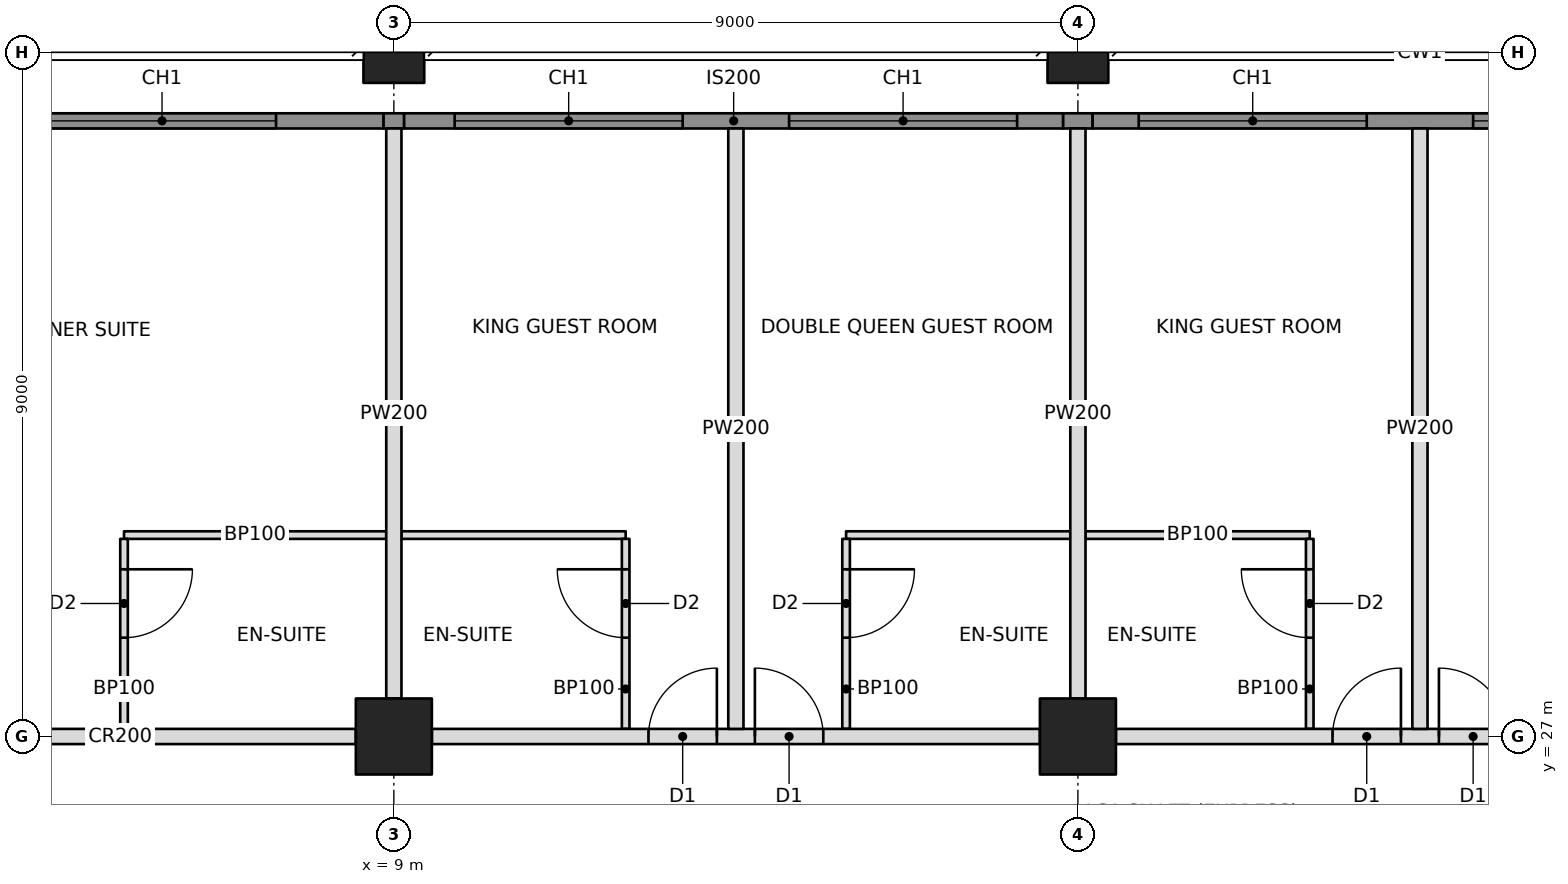
"""IFC4 building model, lengths in metres.
Left out: names, types, materials, properties, quantities, classifications, styles, units other than length and angle.
Written with IfcOpenShell. Run it as: python <this file> out.ifc"""

import sys

from ifc_helpers import new_model, si_unit, direction, frame, frame_2d, origin, origin_2d, place, context, subcontext, project, spatial, rectangle, hollow_rectangle, extrude, element, fill, save


model = new_model("IFC4")
c1 = context("Model", 3, precision=1e-05, world=origin(), true_north=direction((0.0, 1.0)))
c2 = subcontext(c1, "Body", "Model", "MODEL_VIEW")
j1 = project(units=[si_unit("LENGTHUNIT", "METRE"), si_unit("PLANEANGLEUNIT", "RADIAN")], contexts=[c1])
p1 = place(None, origin())
s1 = spatial("IfcSite", under=j1, at=p1, CompositionType="ELEMENT")
p2 = place(p1, origin())
s2 = spatial("IfcBuilding", under=s1, at=p2, CompositionType="ELEMENT")
p3 = place(p2, frame((0.0, 0.0, 97.6)))
s3 = spatial("IfcBuildingStorey", under=s2, at=p3, CompositionType="ELEMENT", Elevation=97.6)
p4 = place(p3, frame((9.0, 27.0, 0.0), z_axis=(0.0, 0.0, 1.0), x_axis=(1.0, 0.0, 0.0)))
e1 = element("IfcColumn", 1, at=p4, inside=s3, PredefinedType="COLUMN", context=c2, shape_type="SweptSolid", body=[
    extrude(hollow_rectangle(XDim=1.0, YDim=1.0, WallThickness=0.1, at=origin_2d()), origin(), (0.0, 0.0, 1.0), 3.4),
])
p5 = place(p3, frame((9.0, 36.0, 0.0), z_axis=(0.0, 0.0, 1.0), x_axis=(1.0, 0.0, 0.0)))
e2 = element("IfcColumn", 2, at=p5, inside=s3, PredefinedType="COLUMN", context=c2, shape_type="SweptSolid", body=[
    extrude(hollow_rectangle(XDim=0.8, YDim=0.8, WallThickness=0.07, at=origin_2d()), origin(), (0.0, 0.0, 1.0), 3.4),
])
p6 = place(p3, frame((18.0, 27.0, 0.0), z_axis=(0.0, 0.0, 1.0), x_axis=(1.0, 0.0, 0.0)))
e3 = element("IfcColumn", 3, at=p6, inside=s3, PredefinedType="COLUMN", context=c2, shape_type="SweptSolid", body=[
    extrude(hollow_rectangle(XDim=1.0, YDim=1.0, WallThickness=0.1, at=origin_2d()), origin(), (0.0, 0.0, 1.0), 3.4),
])
p7 = place(p3, frame((18.0, 36.0, 0.0), z_axis=(0.0, 0.0, 1.0), x_axis=(1.0, 0.0, 0.0)))
e4 = element("IfcColumn", 4, at=p7, inside=s3, PredefinedType="COLUMN", context=c2, shape_type="SweptSolid", body=[
    extrude(hollow_rectangle(XDim=0.8, YDim=0.8, WallThickness=0.07, at=origin_2d()), origin(), (0.0, 0.0, 1.0), 3.4),
])
p8 = place(p3, frame((3.0, 35.1, 0.0), z_axis=(0.0, 0.0, 1.0), x_axis=(1.0, 0.0, 0.0)))
e5 = element("IfcWall", 5, at=p8, inside=s3, PredefinedType="SOLIDWALL", context=c2, shape_type="SweptSolid", body=[
    extrude(rectangle(XDim=5.865, YDim=0.2, at=frame_2d((2.932, 0.0))), origin(), (0.0, 0.0, 1.0), 3.2),
])
p9 = place(p8, frame((1.45, 0.0, 0.6)))
e6 = element("IfcOpeningElement", 6, at=p9, cuts=e5, PredefinedType="OPENING", context=c2, shape_type="SweptSolid", body=[
    extrude(rectangle(XDim=3.0, YDim=2.2, at=frame_2d((1.5, 1.1))), frame((0.0, 0.11, 0.0), z_axis=(0.0, -1.0, 0.0), x_axis=(1.0, 0.0, 0.0)), (0.0, 0.0, 1.0), 0.22),
])
p10 = place(p3, frame((1.0, 27.0, 0.0), z_axis=(0.0, 0.0, 1.0), x_axis=(1.0, 0.0, 0.0)))
e7 = element("IfcWall", 7, at=p10, inside=s3, PredefinedType="PARTITIONING", context=c2, shape_type="SweptSolid", body=[
    extrude(rectangle(XDim=7.5, YDim=0.2, at=frame_2d((3.75, 0.0))), origin(), (0.0, 0.0, 1.0), 2.438),
])
p11 = place(p10, frame((0.25, 0.0, 0.0)))
e8 = element("IfcOpeningElement", 8, at=p11, cuts=e7, PredefinedType="OPENING", context=c2, shape_type="SweptSolid", body=[
    extrude(rectangle(XDim=0.9, YDim=2.1, at=frame_2d((0.45, 1.05))), frame((0.0, 0.11, 0.0), z_axis=(0.0, -1.0, 0.0), x_axis=(1.0, 0.0, 0.0)), (0.0, 0.0, 1.0), 0.22),
])
p12 = place(p3, frame((9.5, 27.0, 0.0), z_axis=(0.0, 0.0, 1.0), x_axis=(1.0, 0.0, 0.0)))
e9 = element("IfcWall", 9, at=p12, inside=s3, PredefinedType="PARTITIONING", context=c2, shape_type="SweptSolid", body=[
    extrude(rectangle(XDim=8.0, YDim=0.2, at=frame_2d((4.0, 0.0))), origin(), (0.0, 0.0, 1.0), 2.405),
])
p13 = place(p12, frame((2.85, 0.0, 0.0)))
e10 = element("IfcOpeningElement", 10, at=p13, cuts=e9, PredefinedType="OPENING", context=c2, shape_type="SweptSolid", body=[
    extrude(rectangle(XDim=0.9, YDim=2.1, at=frame_2d((0.45, 1.05))), frame((0.0, 0.11, 0.0), z_axis=(0.0, -1.0, 0.0), x_axis=(1.0, 0.0, 0.0)), (0.0, 0.0, 1.0), 0.22),
])
p14 = place(p12, frame((4.25, 0.0, 0.0)))
e11 = element("IfcOpeningElement", 11, at=p14, cuts=e9, PredefinedType="OPENING", context=c2, shape_type="SweptSolid", body=[
    extrude(rectangle(XDim=0.9, YDim=2.1, at=frame_2d((0.45, 1.05))), frame((0.0, 0.11, 0.0), z_axis=(0.0, -1.0, 0.0), x_axis=(1.0, 0.0, 0.0)), (0.0, 0.0, 1.0), 0.22),
])
p15 = place(p3, frame((18.5, 27.0, 0.0), z_axis=(0.0, 0.0, 1.0), x_axis=(1.0, 0.0, 0.0)))
e12 = element("IfcWall", 12, at=p15, inside=s3, PredefinedType="PARTITIONING", context=c2, shape_type="SweptSolid", body=[
    extrude(rectangle(XDim=8.0, YDim=0.2, at=frame_2d((4.0, 0.0))), origin(), (0.0, 0.0, 1.0), 2.405),
])
p16 = place(p15, frame((2.85, 0.0, 0.0)))
e13 = element("IfcOpeningElement", 13, at=p16, cuts=e12, PredefinedType="OPENING", context=c2, shape_type="SweptSolid", body=[
    extrude(rectangle(XDim=0.9, YDim=2.1, at=frame_2d((0.45, 1.05))), frame((0.0, 0.11, 0.0), z_axis=(0.0, -1.0, 0.0), x_axis=(1.0, 0.0, 0.0)), (0.0, 0.0, 1.0), 0.22),
])
p17 = place(p15, frame((4.25, 0.0, 0.0)))
e14 = element("IfcOpeningElement", 14, at=p17, cuts=e12, PredefinedType="OPENING", context=c2, shape_type="SweptSolid", body=[
    extrude(rectangle(XDim=0.9, YDim=2.1, at=frame_2d((0.45, 1.05))), frame((0.0, 0.11, 0.0), z_axis=(0.0, -1.0, 0.0), x_axis=(1.0, 0.0, 0.0)), (0.0, 0.0, 1.0), 0.22),
])
p18 = place(p3, frame((9.0, 27.5, 0.0), z_axis=(0.0, 0.0, 1.0), x_axis=(0.0, 1.0, 0.0)))
e15 = element("IfcWall", 15, at=p18, inside=s3, PredefinedType="PARTITIONING", context=c2, shape_type="SweptSolid", body=[
    extrude(rectangle(XDim=7.5, YDim=0.2, at=frame_2d((3.75, 0.0))), origin(), (0.0, 0.0, 1.0), 2.438),
])
p19 = place(p3, frame((13.5, 27.1, 0.0), z_axis=(0.0, 0.0, 1.0), x_axis=(0.0, 1.0, 0.0)))
e16 = element("IfcWall", 16, at=p19, inside=s3, PredefinedType="PARTITIONING", context=c2, shape_type="SweptSolid", body=[
    extrude(rectangle(XDim=7.9, YDim=0.2, at=frame_2d((3.95, 0.0))), origin(), (0.0, 0.0, 1.0), 2.404),
])
p20 = place(p3, frame((18.0, 27.5, 0.0), z_axis=(0.0, 0.0, 1.0), x_axis=(0.0, 1.0, 0.0)))
e17 = element("IfcWall", 17, at=p20, inside=s3, PredefinedType="PARTITIONING", context=c2, shape_type="SweptSolid", body=[
    extrude(rectangle(XDim=7.5, YDim=0.2, at=frame_2d((3.75, 0.0))), origin(), (0.0, 0.0, 1.0), 2.405),
])
p21 = place(p3, frame((22.5, 27.1, 0.0), z_axis=(0.0, 0.0, 1.0), x_axis=(0.0, 1.0, 0.0)))
e18 = element("IfcWall", 18, at=p21, inside=s3, PredefinedType="PARTITIONING", context=c2, shape_type="SweptSolid", body=[
    extrude(rectangle(XDim=7.9, YDim=0.2, at=frame_2d((3.95, 0.0))), origin(), (0.0, 0.0, 1.0), 2.404),
])
p22 = place(p3, frame((5.45, 29.65, 0.0), z_axis=(0.0, 0.0, 1.0), x_axis=(1.0, 0.0, 0.0)))
e19 = element("IfcWall", 19, at=p22, inside=s3, PredefinedType="PARTITIONING", context=c2, shape_type="SweptSolid", body=[
    extrude(rectangle(XDim=3.45, YDim=0.1, at=frame_2d((1.725, 0.0))), origin(), (0.0, 0.0, 1.0), 2.438),
])
p23 = place(p3, frame((5.45, 27.1, 0.0), z_axis=(0.0, 0.0, 1.0), x_axis=(0.0, 1.0, 0.0)))
e20 = element("IfcWall", 20, at=p23, inside=s3, PredefinedType="PARTITIONING", context=c2, shape_type="SweptSolid", body=[
    extrude(rectangle(XDim=2.5, YDim=0.1, at=frame_2d((1.25, 0.0))), origin(), (0.0, 0.0, 1.0), 2.438),
])
p24 = place(p23, frame((1.2, 0.0, 0.0)))
e21 = element("IfcOpeningElement", 21, at=p24, cuts=e20, PredefinedType="OPENING", context=c2, shape_type="SweptSolid", body=[
    extrude(rectangle(XDim=0.9, YDim=2.1, at=frame_2d((0.45, 1.05))), frame((0.0, 0.06, 0.0), z_axis=(0.0, -1.0, 0.0), x_axis=(1.0, 0.0, 0.0)), (0.0, 0.0, 1.0), 0.12),
])
p25 = place(p3, frame((9.1, 29.65, 0.0), z_axis=(0.0, 0.0, 1.0), x_axis=(1.0, 0.0, 0.0)))
e22 = element("IfcWall", 22, at=p25, inside=s3, PredefinedType="PARTITIONING", context=c2, shape_type="SweptSolid", body=[
    extrude(rectangle(XDim=2.95, YDim=0.1, at=frame_2d((1.475, 0.0))), origin(), (0.0, 0.0, 1.0), 2.438),
])
p26 = place(p3, frame((12.05, 27.1, 0.0), z_axis=(0.0, 0.0, 1.0), x_axis=(0.0, 1.0, 0.0)))
e23 = element("IfcWall", 23, at=p26, inside=s3, PredefinedType="PARTITIONING", context=c2, shape_type="SweptSolid", body=[
    extrude(rectangle(XDim=2.5, YDim=0.1, at=frame_2d((1.25, 0.0))), origin(), (0.0, 0.0, 1.0), 2.404),
])
p27 = place(p26, frame((1.2, 0.0, 0.0)))
e24 = element("IfcOpeningElement", 24, at=p27, cuts=e23, PredefinedType="OPENING", context=c2, shape_type="SweptSolid", body=[
    extrude(rectangle(XDim=0.9, YDim=2.1, at=frame_2d((0.45, 1.05))), frame((0.0, 0.06, 0.0), z_axis=(0.0, -1.0, 0.0), x_axis=(1.0, 0.0, 0.0)), (0.0, 0.0, 1.0), 0.12),
])
p28 = place(p3, frame((14.95, 29.65, 0.0), z_axis=(0.0, 0.0, 1.0), x_axis=(1.0, 0.0, 0.0)))
e25 = element("IfcWall", 25, at=p28, inside=s3, PredefinedType="PARTITIONING", context=c2, shape_type="SweptSolid", body=[
    extrude(rectangle(XDim=2.95, YDim=0.1, at=frame_2d((1.475, 0.0))), origin(), (0.0, 0.0, 1.0), 2.404),
])
p29 = place(p3, frame((14.95, 27.1, 0.0), z_axis=(0.0, 0.0, 1.0), x_axis=(0.0, 1.0, 0.0)))
e26 = element("IfcWall", 26, at=p29, inside=s3, PredefinedType="PARTITIONING", context=c2, shape_type="SweptSolid", body=[
    extrude(rectangle(XDim=2.5, YDim=0.1, at=frame_2d((1.25, 0.0))), origin(), (0.0, 0.0, 1.0), 2.404),
])
p30 = place(p29, frame((1.2, 0.0, 0.0)))
e27 = element("IfcOpeningElement", 27, at=p30, cuts=e26, PredefinedType="OPENING", context=c2, shape_type="SweptSolid", body=[
    extrude(rectangle(XDim=0.9, YDim=2.1, at=frame_2d((0.45, 1.05))), frame((0.0, 0.06, 0.0), z_axis=(0.0, -1.0, 0.0), x_axis=(1.0, 0.0, 0.0)), (0.0, 0.0, 1.0), 0.12),
])
p31 = place(p3, frame((18.1, 29.65, 0.0), z_axis=(0.0, 0.0, 1.0), x_axis=(1.0, 0.0, 0.0)))
e28 = element("IfcWall", 28, at=p31, inside=s3, PredefinedType="PARTITIONING", context=c2, shape_type="SweptSolid", body=[
    extrude(rectangle(XDim=2.95, YDim=0.1, at=frame_2d((1.475, 0.0))), origin(), (0.0, 0.0, 1.0), 2.404),
])
p32 = place(p3, frame((21.05, 27.1, 0.0), z_axis=(0.0, 0.0, 1.0), x_axis=(0.0, 1.0, 0.0)))
e29 = element("IfcWall", 29, at=p32, inside=s3, PredefinedType="PARTITIONING", context=c2, shape_type="SweptSolid", body=[
    extrude(rectangle(XDim=2.5, YDim=0.1, at=frame_2d((1.25, 0.0))), origin(), (0.0, 0.0, 1.0), 2.404),
])
p33 = place(p32, frame((1.2, 0.0, 0.0)))
e30 = element("IfcOpeningElement", 30, at=p33, cuts=e29, PredefinedType="OPENING", context=c2, shape_type="SweptSolid", body=[
    extrude(rectangle(XDim=0.9, YDim=2.1, at=frame_2d((0.45, 1.05))), frame((0.0, 0.06, 0.0), z_axis=(0.0, -1.0, 0.0), x_axis=(1.0, 0.0, 0.0)), (0.0, 0.0, 1.0), 0.12),
])
p34 = place(p3, frame((8.865, 35.1, 0.0), z_axis=(0.0, 0.0, 1.0), x_axis=(1.0, 0.0, 0.0)))
e31 = element("IfcWall", 31, at=p34, inside=s3, PredefinedType="SOLIDWALL", context=c2, shape_type="SweptSolid", body=[
    extrude(rectangle(XDim=0.271, YDim=0.2, at=frame_2d((0.135, 0.0))), origin(), (0.0, 0.0, 1.0), 2.438),
])
p35 = place(p3, frame((9.135, 35.1, 0.0), z_axis=(0.0, 0.0, 1.0), x_axis=(1.0, 0.0, 0.0)))
e32 = element("IfcWall", 32, at=p35, inside=s3, PredefinedType="SOLIDWALL", context=c2, shape_type="SweptSolid", body=[
    extrude(rectangle(XDim=8.671, YDim=0.2, at=frame_2d((4.335, 0.0))), origin(), (0.0, 0.0, 1.0), 3.2),
])
p36 = place(p35, frame((0.665, 0.0, 0.6)))
e33 = element("IfcOpeningElement", 33, at=p36, cuts=e32, PredefinedType="OPENING", context=c2, shape_type="SweptSolid", body=[
    extrude(rectangle(XDim=3.0, YDim=2.2, at=frame_2d((1.5, 1.1))), frame((0.0, 0.11, 0.0), z_axis=(0.0, -1.0, 0.0), x_axis=(1.0, 0.0, 0.0)), (0.0, 0.0, 1.0), 0.22),
])
p37 = place(p35, frame((5.065, 0.0, 0.6)))
e34 = element("IfcOpeningElement", 34, at=p37, cuts=e32, PredefinedType="OPENING", context=c2, shape_type="SweptSolid", body=[
    extrude(rectangle(XDim=3.0, YDim=2.2, at=frame_2d((1.5, 1.1))), frame((0.0, 0.11, 0.0), z_axis=(0.0, -1.0, 0.0), x_axis=(1.0, 0.0, 0.0)), (0.0, 0.0, 1.0), 0.22),
])
p38 = place(p3, frame((17.806, 35.1, 0.0), z_axis=(0.0, 0.0, 1.0), x_axis=(1.0, 0.0, 0.0)))
e35 = element("IfcWall", 35, at=p38, inside=s3, PredefinedType="SOLIDWALL", context=c2, shape_type="SweptSolid", body=[
    extrude(rectangle(XDim=0.388, YDim=0.2, at=frame_2d((0.194, 0.0))), origin(), (0.0, 0.0, 1.0), 2.404),
])
p39 = place(p3, frame((18.194, 35.1, 0.0), z_axis=(0.0, 0.0, 1.0), x_axis=(1.0, 0.0, 0.0)))
e36 = element("IfcWall", 36, at=p39, inside=s3, PredefinedType="SOLIDWALL", context=c2, shape_type="SweptSolid", body=[
    extrude(rectangle(XDim=8.612, YDim=0.2, at=frame_2d((4.306, 0.0))), origin(), (0.0, 0.0, 1.0), 3.2),
])
p40 = place(p39, frame((0.606, 0.0, 0.6)))
e37 = element("IfcOpeningElement", 37, at=p40, cuts=e36, PredefinedType="OPENING", context=c2, shape_type="SweptSolid", body=[
    extrude(rectangle(XDim=3.0, YDim=2.2, at=frame_2d((1.5, 1.1))), frame((0.0, 0.11, 0.0), z_axis=(0.0, -1.0, 0.0), x_axis=(1.0, 0.0, 0.0)), (0.0, 0.0, 1.0), 0.22),
])
p41 = place(p39, frame((5.006, 0.0, 0.6)))
e38 = element("IfcOpeningElement", 38, at=p41, cuts=e36, PredefinedType="OPENING", context=c2, shape_type="SweptSolid", body=[
    extrude(rectangle(XDim=3.0, YDim=2.2, at=frame_2d((1.5, 1.1))), frame((0.0, 0.11, 0.0), z_axis=(0.0, -1.0, 0.0), x_axis=(1.0, 0.0, 0.0)), (0.0, 0.0, 1.0), 0.22),
])
p42 = place(p9, origin())
e39 = element("IfcWindow", 39, at=p42, inside=s3, PartitioningType="TRIPLE_PANEL_VERTICAL", PredefinedType="WINDOW", context=c2, shape_type="SweptSolid", body=[
    extrude(rectangle(XDim=3.0, YDim=2.2, at=frame_2d((1.5, 1.1))), frame((0.0, 0.03, 0.0), z_axis=(0.0, -1.0, 0.0), x_axis=(1.0, 0.0, 0.0)), (0.0, 0.0, 1.0), 0.06),
])
fill(e6, e39)
p43 = place(p36, origin())
e40 = element("IfcWindow", 40, at=p43, inside=s3, PartitioningType="TRIPLE_PANEL_VERTICAL", PredefinedType="WINDOW", context=c2, shape_type="SweptSolid", body=[
    extrude(rectangle(XDim=3.0, YDim=2.2, at=frame_2d((1.5, 1.1))), frame((0.0, 0.03, 0.0), z_axis=(0.0, -1.0, 0.0), x_axis=(1.0, 0.0, 0.0)), (0.0, 0.0, 1.0), 0.06),
])
fill(e33, e40)
p44 = place(p37, origin())
e41 = element("IfcWindow", 41, at=p44, inside=s3, PartitioningType="TRIPLE_PANEL_VERTICAL", PredefinedType="WINDOW", context=c2, shape_type="SweptSolid", body=[
    extrude(rectangle(XDim=3.0, YDim=2.2, at=frame_2d((1.5, 1.1))), frame((0.0, 0.03, 0.0), z_axis=(0.0, -1.0, 0.0), x_axis=(1.0, 0.0, 0.0)), (0.0, 0.0, 1.0), 0.06),
])
fill(e34, e41)
p45 = place(p40, origin())
e42 = element("IfcWindow", 42, at=p45, inside=s3, PartitioningType="TRIPLE_PANEL_VERTICAL", PredefinedType="WINDOW", context=c2, shape_type="SweptSolid", body=[
    extrude(rectangle(XDim=3.0, YDim=2.2, at=frame_2d((1.5, 1.1))), frame((0.0, 0.03, 0.0), z_axis=(0.0, -1.0, 0.0), x_axis=(1.0, 0.0, 0.0)), (0.0, 0.0, 1.0), 0.06),
])
fill(e37, e42)
p46 = place(p41, origin())
e43 = element("IfcWindow", 43, at=p46, inside=s3, PartitioningType="TRIPLE_PANEL_VERTICAL", PredefinedType="WINDOW", context=c2, shape_type="SweptSolid", body=[
    extrude(rectangle(XDim=3.0, YDim=2.2, at=frame_2d((1.5, 1.1))), frame((0.0, 0.03, 0.0), z_axis=(0.0, -1.0, 0.0), x_axis=(1.0, 0.0, 0.0)), (0.0, 0.0, 1.0), 0.06),
])
fill(e38, e43)
p47 = place(p24, frame((0.9, 0.0, 0.0), z_axis=(0.0, 0.0, 1.0), x_axis=(-1.0, 0.0, 0.0)))
e44 = element("IfcDoor", 44, at=p47, inside=s3, OperationType="SINGLE_SWING_LEFT", PredefinedType="DOOR", context=c2, shape_type="SweptSolid", body=[
    extrude(rectangle(XDim=0.9, YDim=2.1, at=frame_2d((0.45, 1.05))), frame((0.0, 0.025, 0.0), z_axis=(0.0, -1.0, 0.0), x_axis=(1.0, 0.0, 0.0)), (0.0, 0.0, 1.0), 0.05),
])
fill(e21, e44)
p48 = place(p27, origin())
e45 = element("IfcDoor", 45, at=p48, inside=s3, OperationType="SINGLE_SWING_RIGHT", PredefinedType="DOOR", context=c2, shape_type="SweptSolid", body=[
    extrude(rectangle(XDim=0.9, YDim=2.1, at=frame_2d((0.45, 1.05))), frame((0.0, 0.025, 0.0), z_axis=(0.0, -1.0, 0.0), x_axis=(1.0, 0.0, 0.0)), (0.0, 0.0, 1.0), 0.05),
])
fill(e24, e45)
p49 = place(p13, origin())
e46 = element("IfcDoor", 46, at=p49, inside=s3, OperationType="SINGLE_SWING_RIGHT", PredefinedType="DOOR", context=c2, shape_type="SweptSolid", body=[
    extrude(rectangle(XDim=0.9, YDim=2.1, at=frame_2d((0.45, 1.05))), frame((0.0, 0.025, 0.0), z_axis=(0.0, -1.0, 0.0), x_axis=(1.0, 0.0, 0.0)), (0.0, 0.0, 1.0), 0.05),
])
fill(e10, e46)
p50 = place(p30, frame((0.9, 0.0, 0.0), z_axis=(0.0, 0.0, 1.0), x_axis=(-1.0, 0.0, 0.0)))
e47 = element("IfcDoor", 47, at=p50, inside=s3, OperationType="SINGLE_SWING_LEFT", PredefinedType="DOOR", context=c2, shape_type="SweptSolid", body=[
    extrude(rectangle(XDim=0.9, YDim=2.1, at=frame_2d((0.45, 1.05))), frame((0.0, 0.025, 0.0), z_axis=(0.0, -1.0, 0.0), x_axis=(1.0, 0.0, 0.0)), (0.0, 0.0, 1.0), 0.05),
])
fill(e27, e47)
p51 = place(p14, origin())
e48 = element("IfcDoor", 48, at=p51, inside=s3, OperationType="SINGLE_SWING_LEFT", PredefinedType="DOOR", context=c2, shape_type="SweptSolid", body=[
    extrude(rectangle(XDim=0.9, YDim=2.1, at=frame_2d((0.45, 1.05))), frame((0.0, 0.025, 0.0), z_axis=(0.0, -1.0, 0.0), x_axis=(1.0, 0.0, 0.0)), (0.0, 0.0, 1.0), 0.05),
])
fill(e11, e48)
p52 = place(p33, origin())
e49 = element("IfcDoor", 49, at=p52, inside=s3, OperationType="SINGLE_SWING_RIGHT", PredefinedType="DOOR", context=c2, shape_type="SweptSolid", body=[
    extrude(rectangle(XDim=0.9, YDim=2.1, at=frame_2d((0.45, 1.05))), frame((0.0, 0.025, 0.0), z_axis=(0.0, -1.0, 0.0), x_axis=(1.0, 0.0, 0.0)), (0.0, 0.0, 1.0), 0.05),
])
fill(e30, e49)
p53 = place(p16, origin())
e50 = element("IfcDoor", 50, at=p53, inside=s3, OperationType="SINGLE_SWING_RIGHT", PredefinedType="DOOR", context=c2, shape_type="SweptSolid", body=[
    extrude(rectangle(XDim=0.9, YDim=2.1, at=frame_2d((0.45, 1.05))), frame((0.0, 0.025, 0.0), z_axis=(0.0, -1.0, 0.0), x_axis=(1.0, 0.0, 0.0)), (0.0, 0.0, 1.0), 0.05),
])
fill(e13, e50)
p54 = place(p17, origin())
e51 = element("IfcDoor", 51, at=p54, inside=s3, OperationType="SINGLE_SWING_LEFT", PredefinedType="DOOR", context=c2, shape_type="SweptSolid", body=[
    extrude(rectangle(XDim=0.9, YDim=2.1, at=frame_2d((0.45, 1.05))), frame((0.0, 0.025, 0.0), z_axis=(0.0, -1.0, 0.0), x_axis=(1.0, 0.0, 0.0)), (0.0, 0.0, 1.0), 0.05),
])
fill(e14, e51)
save(model, sys.argv[1])
